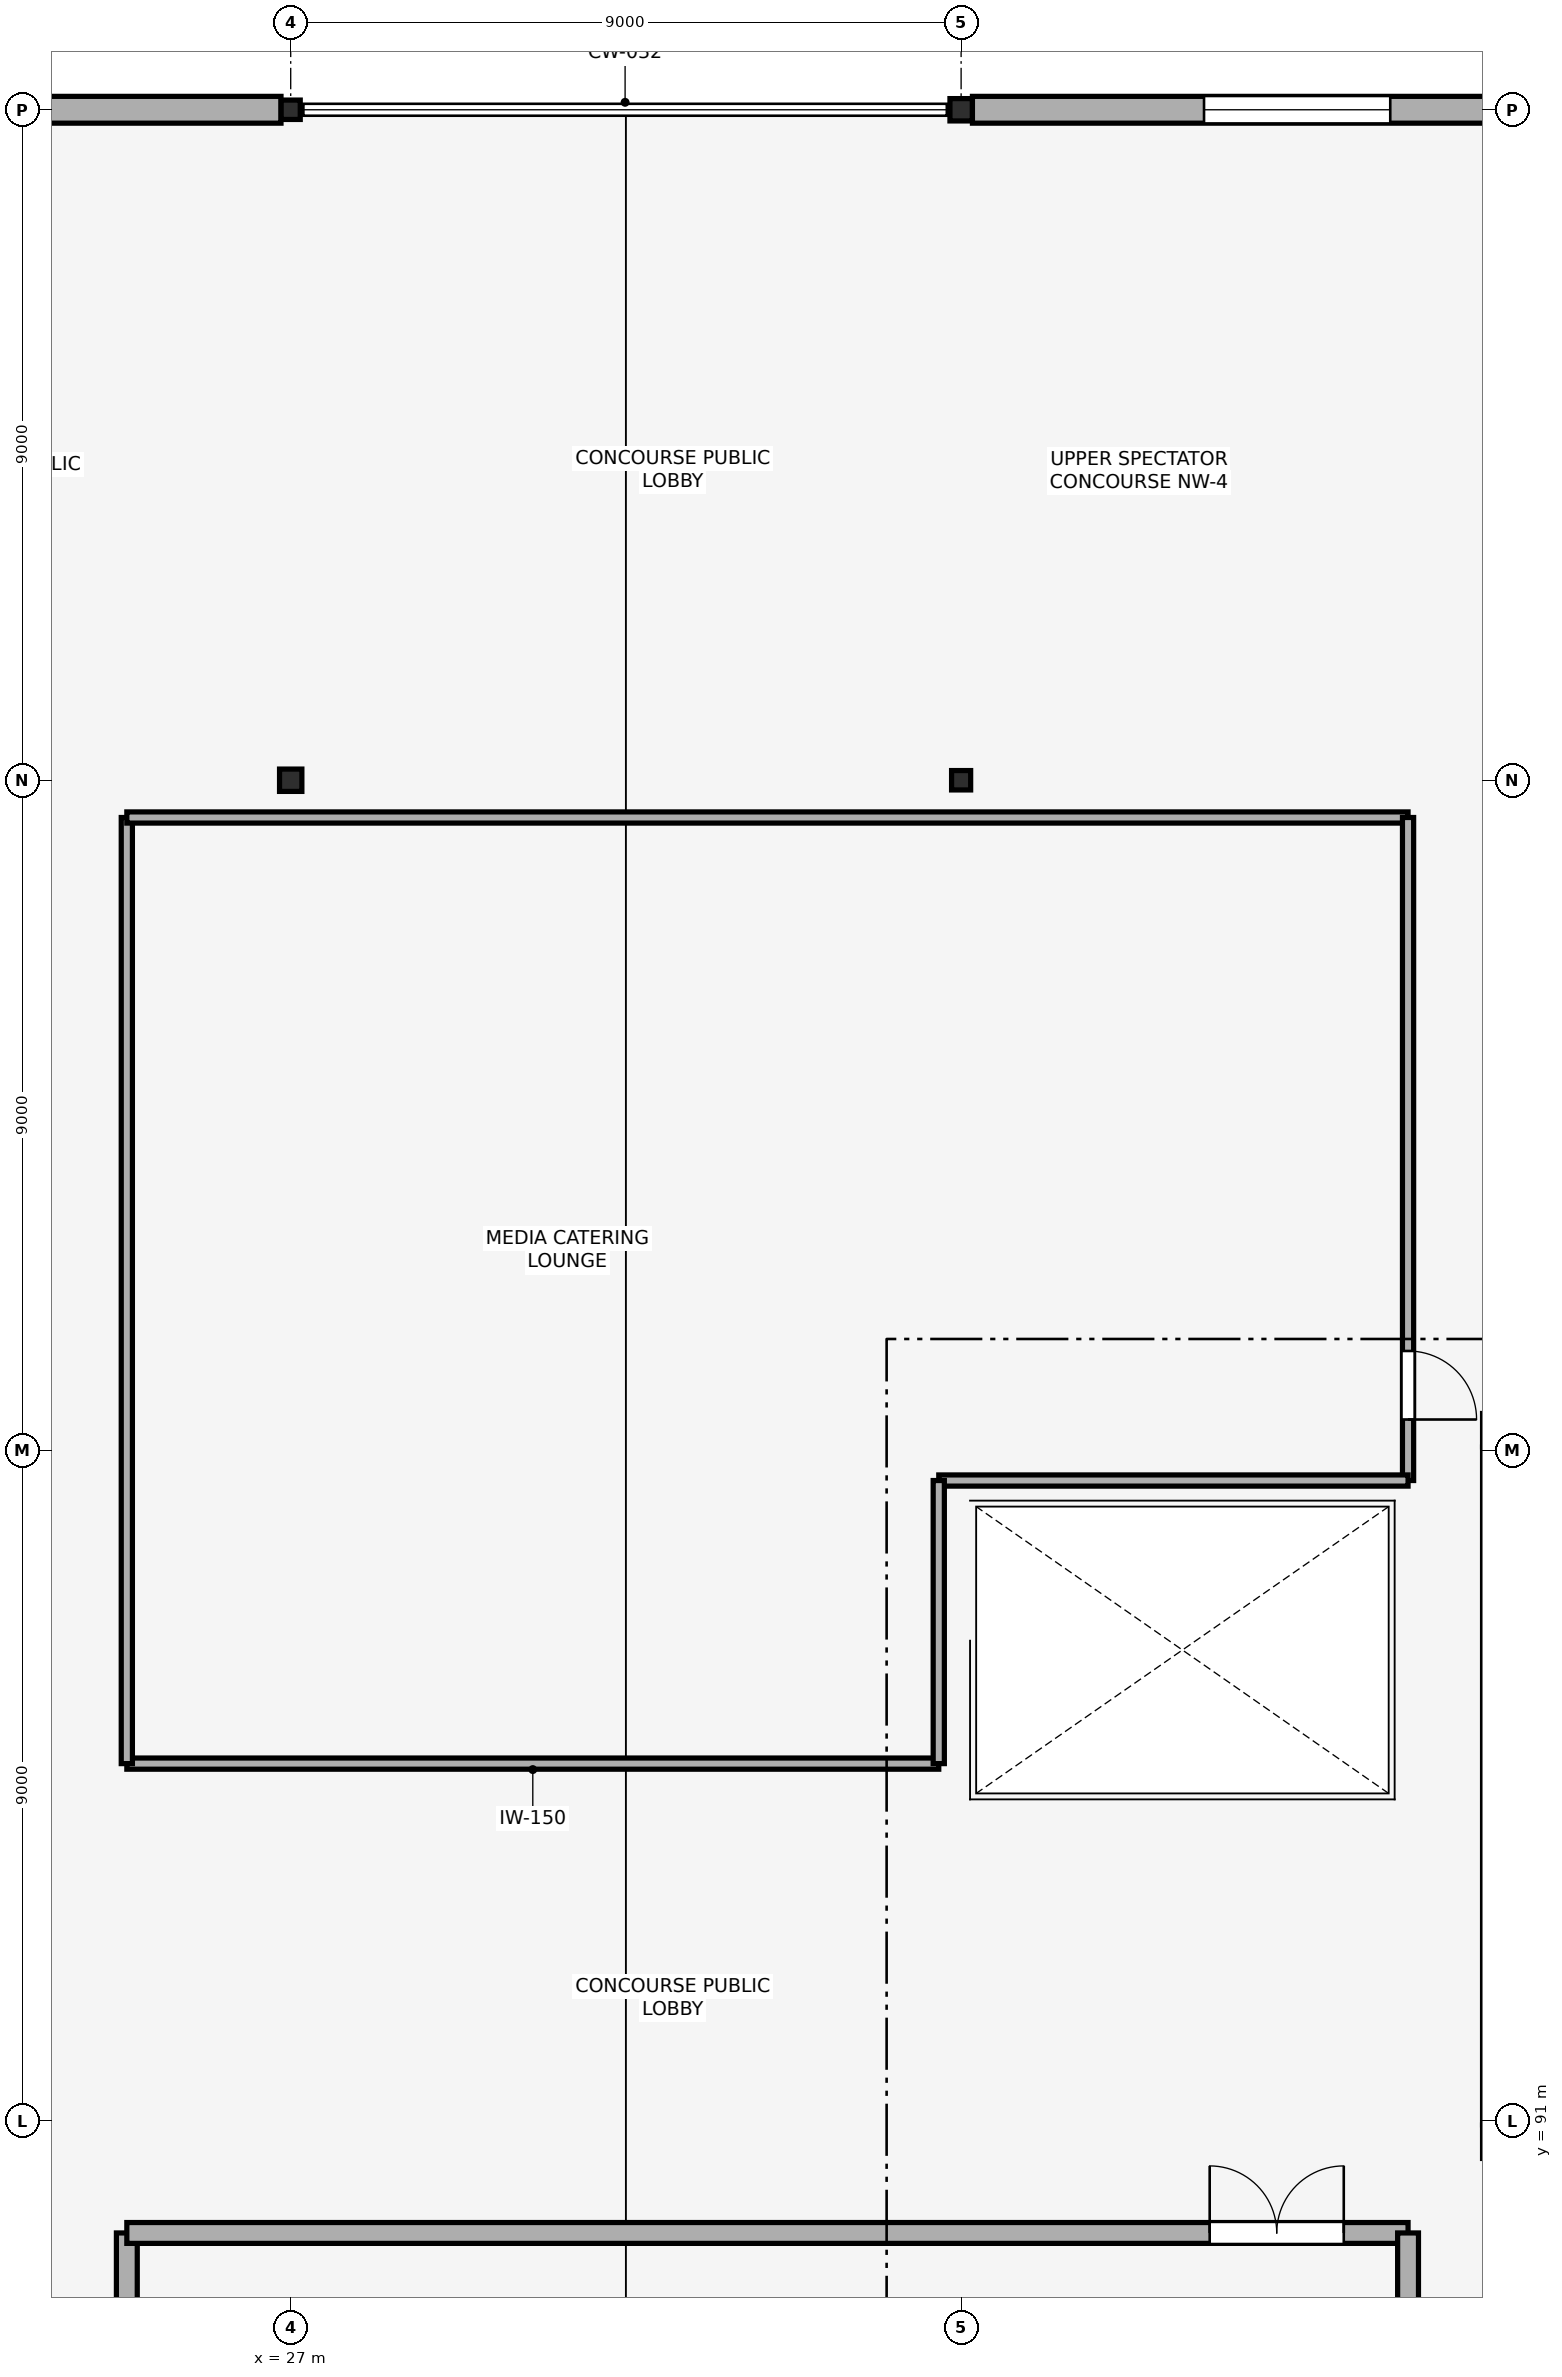
"""IFC4 building model, lengths in metres.
Left out: names, types, materials, properties, quantities, classifications, styles, units other than length and angle.
Written with IfcOpenShell. Run it as: python <this file> out.ifc"""

import sys

from ifc_helpers import new_model, si_unit, direction, frame, frame_2d, origin, origin_2d, place, context, subcontext, project, spatial, rectangle, hollow_rectangle, i_section, extrude, element, fill, save


model = new_model("IFC4")
c1 = context("Model", 3, precision=1e-05, world=origin(), true_north=direction((0.0, 1.0)))
c2 = subcontext(c1, "Body", "Model", "MODEL_VIEW")
j1 = project(units=[si_unit("LENGTHUNIT", "METRE"), si_unit("PLANEANGLEUNIT", "RADIAN")], contexts=[c1])
p1 = place(None, origin())
s1 = spatial("IfcSite", under=j1, at=p1, CompositionType="ELEMENT")
p2 = place(p1, origin())
s2 = spatial("IfcBuilding", under=s1, at=p2, CompositionType="ELEMENT")
p3 = place(p2, frame((0.0, 0.0, 15.0)))
s3 = spatial("IfcBuildingStorey", under=s2, at=p3, CompositionType="ELEMENT", Elevation=15.0)
p4 = place(p3, frame((27.0, 109.0, 0.0), z_axis=(0.0, 0.0, 1.0), x_axis=(1.0, 0.0, 0.0)))
e1 = element("IfcColumn", 1, at=p4, inside=s3, PredefinedType="COLUMN", context=c2, shape_type="SweptSolid", body=[
    extrude(hollow_rectangle(XDim=0.3, YDim=0.3, WallThickness=0.012, at=origin_2d()), origin(), (0.0, 0.0, 1.0), 4.5),
])
for number, where, z_axis, x_axis in (
    (2, (27.0, 118.0, 0.0), (0.0, 0.0, 1.0), (1.0, 0.0, 0.0)),
    (3, (36.0, 109.0, 0.0), (0.0, 0.0, 1.0), (1.0, 0.0, 0.0)),
):
    element("IfcColumn", number, at=place(p3, frame(where, z_axis=z_axis, x_axis=x_axis)), inside=s3, PredefinedType="COLUMN", context=c2, shape_type="SweptSolid", body=[
        extrude(i_section(OverallWidth=0.256, OverallDepth=0.26, WebThickness=0.01, FlangeThickness=0.017, FilletRadius=0.013, at=origin_2d()), origin(), (0.0, 0.0, 1.0), 4.5),
    ])
p5 = place(p3, frame((36.0, 118.0, 0.0), z_axis=(0.0, 0.0, 1.0), x_axis=(1.0, 0.0, 0.0)))
e4 = element("IfcColumn", 4, at=p5, inside=s3, PredefinedType="COLUMN", context=c2, shape_type="SweptSolid", body=[
    extrude(hollow_rectangle(XDim=0.3, YDim=0.3, WallThickness=0.012, at=origin_2d()), origin(), (0.0, 0.0, 1.0), 4.5),
])
p6 = place(p3, frame((18.152, 118.0, 0.0), z_axis=(0.0, 0.0, 1.0), x_axis=(1.0, 0.0, 0.0)))
e5 = element("IfcWall", 5, at=p6, inside=s3, PredefinedType="STANDARD", context=c2, shape_type="SweptSolid", body=[
    extrude(rectangle(XDim=8.718, YDim=0.36, at=frame_2d((4.359, 0.0))), origin(), (0.0, 0.0, 1.0), 3.637),
])
p7 = place(p6, frame((3.109, 0.0, 0.85)))
e6 = element("IfcOpeningElement", 6, at=p7, cuts=e5, PredefinedType="OPENING", context=c2, shape_type="SweptSolid", body=[
    extrude(rectangle(XDim=2.5, YDim=1.7, at=frame_2d((1.25, 0.85))), frame((0.0, 0.19, 0.0), z_axis=(0.0, -1.0, 0.0), x_axis=(1.0, 0.0, 0.0)), (0.0, 0.0, 1.0), 0.38),
])
p8 = place(p3, frame((36.152, 118.0, 0.0), z_axis=(0.0, 0.0, 1.0), x_axis=(1.0, 0.0, 0.0)))
e7 = element("IfcWall", 7, at=p8, inside=s3, PredefinedType="STANDARD", context=c2, shape_type="SweptSolid", body=[
    extrude(rectangle(XDim=8.718, YDim=0.36, at=frame_2d((4.359, 0.0))), origin(), (0.0, 0.0, 1.0), 3.637),
])
p9 = place(p8, frame((3.109, 0.0, 0.85)))
e8 = element("IfcOpeningElement", 8, at=p9, cuts=e7, PredefinedType="OPENING", context=c2, shape_type="SweptSolid", body=[
    extrude(rectangle(XDim=2.5, YDim=1.7, at=frame_2d((1.25, 0.85))), frame((0.0, 0.19, 0.0), z_axis=(0.0, -1.0, 0.0), x_axis=(1.0, 0.0, 0.0)), (0.0, 0.0, 1.0), 0.38),
])
p10 = place(p3, frame((24.8, 73.5, 0.0), z_axis=(0.0, 0.0, 1.0), x_axis=(0.0, 1.0, 0.0)))
e9 = element("IfcWall", 9, at=p10, inside=s3, PredefinedType="PARTITIONING", context=c2, shape_type="SweptSolid", body=[
    extrude(rectangle(XDim=16.0, YDim=0.28, at=frame_2d((8.0, 0.0))), origin(), (0.0, 0.0, 1.0), 4.25),
])
p11 = place(p3, frame((24.8, 89.5, 0.0), z_axis=(0.0, 0.0, 1.0), x_axis=(1.0, 0.0, 0.0)))
e10 = element("IfcWall", 10, at=p11, inside=s3, PredefinedType="PARTITIONING", context=c2, shape_type="SweptSolid", body=[
    extrude(rectangle(XDim=17.2, YDim=0.28, at=frame_2d((8.6, 0.0))), origin(), (0.0, 0.0, 1.0), 4.25),
])
p12 = place(p11, frame((14.537, 0.0, 0.0)))
e11 = element("IfcOpeningElement", 11, at=p12, cuts=e10, PredefinedType="OPENING", context=c2, shape_type="SweptSolid", body=[
    extrude(rectangle(XDim=1.8, YDim=2.2, at=frame_2d((0.9, 1.1))), frame((0.0, 0.15, 0.0), z_axis=(0.0, -1.0, 0.0), x_axis=(1.0, 0.0, 0.0)), (0.0, 0.0, 1.0), 0.3),
])
p13 = place(p3, frame((42.0, 89.5, 0.0), z_axis=(0.0, 0.0, 1.0), x_axis=(0.0, -1.0, 0.0)))
e12 = element("IfcWall", 12, at=p13, inside=s3, PredefinedType="PARTITIONING", context=c2, shape_type="SweptSolid", body=[
    extrude(rectangle(XDim=1.9, YDim=0.28, at=frame_2d((0.95, 0.0))), origin(), (0.0, 0.0, 1.0), 4.25),
])
p14 = place(p3, frame((35.7, 95.8, 0.0), z_axis=(0.0, 0.0, 1.0), x_axis=(-1.0, 0.0, 0.0)))
e13 = element("IfcWall", 13, at=p14, inside=s3, PredefinedType="PARTITIONING", context=c2, shape_type="SweptSolid", body=[
    extrude(rectangle(XDim=10.9, YDim=0.15, at=frame_2d((5.45, 0.0))), origin(), (0.0, 0.0, 1.0), 4.25),
])
p15 = place(p3, frame((24.8, 95.8, 0.0), z_axis=(0.0, 0.0, 1.0), x_axis=(0.0, 1.0, 0.0)))
e14 = element("IfcWall", 14, at=p15, inside=s3, PredefinedType="PARTITIONING", context=c2, shape_type="SweptSolid", body=[
    extrude(rectangle(XDim=12.7, YDim=0.15, at=frame_2d((6.35, 0.0))), origin(), (0.0, 0.0, 1.0), 4.25),
])
p16 = place(p3, frame((24.8, 108.5, 0.0), z_axis=(0.0, 0.0, 1.0), x_axis=(1.0, 0.0, 0.0)))
e15 = element("IfcWall", 15, at=p16, inside=s3, PredefinedType="PARTITIONING", context=c2, shape_type="SweptSolid", body=[
    extrude(rectangle(XDim=17.2, YDim=0.15, at=frame_2d((8.6, 0.0))), origin(), (0.0, 0.0, 1.0), 4.25),
])
p17 = place(p3, frame((42.0, 108.5, 0.0), z_axis=(0.0, 0.0, 1.0), x_axis=(0.0, -1.0, 0.0)))
e16 = element("IfcWall", 16, at=p17, inside=s3, PredefinedType="PARTITIONING", context=c2, shape_type="SweptSolid", body=[
    extrude(rectangle(XDim=8.9, YDim=0.15, at=frame_2d((4.45, 0.0))), origin(), (0.0, 0.0, 1.0), 4.25),
])
p18 = place(p17, frame((7.161, 0.0, 0.0)))
e17 = element("IfcOpeningElement", 17, at=p18, cuts=e16, PredefinedType="OPENING", context=c2, shape_type="SweptSolid", body=[
    extrude(rectangle(XDim=0.92, YDim=2.15, at=frame_2d((0.46, 1.075))), frame((0.0, 0.085, 0.0), z_axis=(0.0, -1.0, 0.0), x_axis=(1.0, 0.0, 0.0)), (0.0, 0.0, 1.0), 0.17),
])
p19 = place(p3, frame((42.0, 99.6, 0.0), z_axis=(0.0, 0.0, 1.0), x_axis=(-1.0, 0.0, 0.0)))
e18 = element("IfcWall", 18, at=p19, inside=s3, PredefinedType="PARTITIONING", context=c2, shape_type="SweptSolid", body=[
    extrude(rectangle(XDim=6.3, YDim=0.15, at=frame_2d((3.15, 0.0))), origin(), (0.0, 0.0, 1.0), 4.25),
])
p20 = place(p3, frame((35.7, 99.6, 0.0), z_axis=(0.0, 0.0, 1.0), x_axis=(0.0, -1.0, 0.0)))
e19 = element("IfcWall", 19, at=p20, inside=s3, PredefinedType="PARTITIONING", context=c2, shape_type="SweptSolid", body=[
    extrude(rectangle(XDim=3.8, YDim=0.15, at=frame_2d((1.9, 0.0))), origin(), (0.0, 0.0, 1.0), 4.25),
])
p21 = place(p9, origin())
e20 = element("IfcWindow", 20, at=p21, inside=s3, PartitioningType="SINGLE_PANEL", PredefinedType="WINDOW", context=c2, shape_type="SweptSolid", body=[
    extrude(rectangle(XDim=2.5, YDim=1.7, at=frame_2d((1.25, 0.85))), frame((0.0, 0.03, 0.0), z_axis=(0.0, -1.0, 0.0), x_axis=(1.0, 0.0, 0.0)), (0.0, 0.0, 1.0), 0.06),
])
fill(e8, e20)
p22 = place(p12, origin())
e21 = element("IfcDoor", 21, at=p22, inside=s3, OperationType="DOUBLE_DOOR_SINGLE_SWING", PredefinedType="DOOR", context=c2, shape_type="SweptSolid", body=[
    extrude(rectangle(XDim=1.8, YDim=2.2, at=frame_2d((0.9, 1.1))), frame((0.0, 0.025, 0.0), z_axis=(0.0, -1.0, 0.0), x_axis=(1.0, 0.0, 0.0)), (0.0, 0.0, 1.0), 0.05),
])
fill(e11, e21)
p23 = place(p18, origin())
e22 = element("IfcDoor", 22, at=p23, inside=s3, OperationType="SINGLE_SWING_RIGHT", PredefinedType="DOOR", context=c2, shape_type="SweptSolid", body=[
    extrude(rectangle(XDim=0.92, YDim=2.15, at=frame_2d((0.46, 1.075))), frame((0.0, 0.025, 0.0), z_axis=(0.0, -1.0, 0.0), x_axis=(1.0, 0.0, 0.0)), (0.0, 0.0, 1.0), 0.05),
])
fill(e17, e22)
save(model, sys.argv[1])
